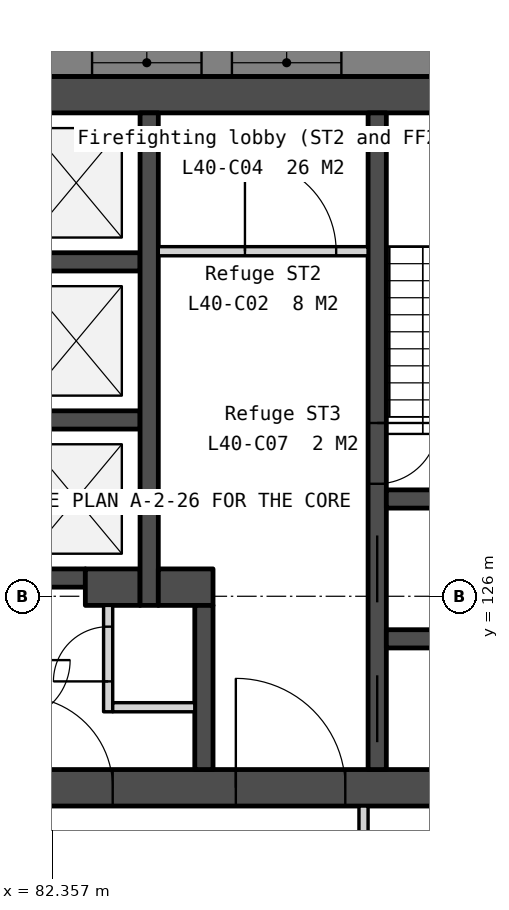
"""IFC4 building model, lengths in metres.
Left out: names, types, materials, properties, quantities, classifications, styles, units other than length and angle.
Written with IfcOpenShell. Run it as: python <this file> out.ifc"""

import sys

from ifc_helpers import new_model, si_unit, direction, frame, frame_2d, origin, place, context, subcontext, project, spatial, polyline, rectangle, outline, extrude, element, fill, save


model = new_model("IFC4")
c1 = context("Model", 3, precision=1e-05, world=origin(), true_north=direction((0.0, 1.0)))
c2 = subcontext(c1, "Body", "Model", "MODEL_VIEW")
j1 = project(units=[si_unit("LENGTHUNIT", "METRE"), si_unit("PLANEANGLEUNIT", "RADIAN")], contexts=[c1])
p1 = place(None, origin())
s1 = spatial("IfcSite", under=j1, at=p1, CompositionType="ELEMENT")
p2 = place(p1, origin())
s2 = spatial("IfcBuilding", under=s1, at=p2, CompositionType="ELEMENT")
p3 = place(p2, frame((0.0, 0.0, 159.8)))
s3 = spatial("IfcBuildingStorey", under=s2, at=p3, CompositionType="ELEMENT", Elevation=159.8)
p4 = place(p3, frame((69.0, 134.25, 0.0), z_axis=(0.0, 0.0, 1.0), x_axis=(1.0, 0.0, 0.0)))
e1 = element("IfcWall", 1, at=p4, inside=s3, PredefinedType="SOLIDWALL", context=c2, shape_type="SweptSolid", body=[
    extrude(rectangle(XDim=22.0, YDim=0.6, at=frame_2d((11.0, 0.0))), origin(), (0.0, 0.0, 1.0), 3.75),
])
p5 = place(p3, frame((69.0, 122.85, 0.0), z_axis=(0.0, 0.0, 1.0), x_axis=(1.0, 0.0, 0.0)))
e2 = element("IfcWall", 2, at=p5, inside=s3, PredefinedType="SOLIDWALL", context=c2, shape_type="SweptSolid", body=[
    extrude(rectangle(XDim=22.0, YDim=0.6, at=frame_2d((11.0, 0.0))), origin(), (0.0, 0.0, 1.0), 3.75),
])
p6 = place(p5, frame((16.375, 0.0, 0.0)))
e3 = element("IfcOpeningElement", 3, at=p6, cuts=e2, PredefinedType="OPENING", context=c2, shape_type="SweptSolid", body=[
    extrude(rectangle(XDim=1.8, YDim=2.1, at=frame_2d((0.9, 1.05))), frame((0.0, 0.31, 0.0), z_axis=(0.0, -1.0, 0.0), x_axis=(1.0, 0.0, 0.0)), (0.0, 0.0, 1.0), 0.62),
])
p7 = place(p5, frame((3.825, 0.0, 0.0)))
e4 = element("IfcOpeningElement", 4, at=p7, cuts=e2, PredefinedType="OPENING", context=c2, shape_type="SweptSolid", body=[
    extrude(rectangle(XDim=1.8, YDim=2.1, at=frame_2d((0.9, 1.05))), frame((0.0, 0.31, 0.0), z_axis=(0.0, -1.0, 0.0), x_axis=(1.0, 0.0, 0.0)), (0.0, 0.0, 1.0), 0.62),
])
p8 = place(p5, frame((12.85, 0.0, 0.0)))
e5 = element("IfcOpeningElement", 5, at=p8, cuts=e2, PredefinedType="OPENING", context=c2, shape_type="SweptSolid", body=[
    extrude(rectangle(XDim=1.5, YDim=2.1, at=frame_2d((0.75, 1.05))), frame((0.0, 0.31, 0.0), z_axis=(0.0, -1.0, 0.0), x_axis=(1.0, 0.0, 0.0)), (0.0, 0.0, 1.0), 0.62),
])
for number, where, z_axis, x_axis in (
    (6, (81.7, 131.5, 0.0), (0.0, 0.0, 1.0), (1.0, 0.0, 0.0)),
    (7, (81.7, 128.9, 0.0), (0.0, 0.0, 1.0), (1.0, 0.0, 0.0)),
):
    element("IfcWall", number, at=place(p3, frame(where, z_axis=z_axis, x_axis=x_axis)), inside=s3, PredefinedType="SOLIDWALL", context=c2, shape_type="SweptSolid", body=[
        extrude(rectangle(XDim=2.1, YDim=0.3, at=frame_2d((1.05, 0.0))), origin(), (0.0, 0.0, 1.0), 3.75),
    ])
p9 = place(p3, frame((81.7, 126.3, 0.0), z_axis=(0.0, 0.0, 1.0), x_axis=(1.0, 0.0, 0.0)))
e8 = element("IfcWall", 8, at=p9, inside=s3, PredefinedType="SOLIDWALL", context=c2, shape_type="SweptSolid", body=[
    extrude(rectangle(XDim=1.2, YDim=0.3, at=frame_2d((0.6, 0.0))), origin(), (0.0, 0.0, 1.0), 3.75),
])
p10 = place(p3, frame((82.9, 126.15, 0.0), z_axis=(0.0, 0.0, 1.0), x_axis=(1.0, 0.0, 0.0)))
e9 = element("IfcWall", 9, at=p10, inside=s3, PredefinedType="SOLIDWALL", context=c2, shape_type="SweptSolid", body=[
    extrude(rectangle(XDim=0.9, YDim=0.6, at=frame_2d((0.45, 0.0))), origin(), (0.0, 0.0, 1.0), 3.75),
])
p11 = place(p3, frame((83.275, 125.85, 0.0), z_axis=(0.0, 0.0, 1.0), x_axis=(0.0, -1.0, 0.0)))
e10 = element("IfcWall", 10, at=p11, inside=s3, PredefinedType="PARTITIONING", context=c2, shape_type="SweptSolid", body=[
    extrude(rectangle(XDim=1.75, YDim=0.15, at=frame_2d((0.875, 0.0))), origin(), (0.0, 0.0, 1.0), 3.75),
])
p12 = place(p11, frame((0.35, 0.0, 0.0)))
e11 = element("IfcOpeningElement", 11, at=p12, cuts=e10, PredefinedType="OPENING", context=c2, shape_type="SweptSolid", body=[
    extrude(rectangle(XDim=0.9, YDim=2.1, at=frame_2d((0.45, 1.05))), frame((0.0, 0.085, 0.0), z_axis=(0.0, -1.0, 0.0), x_axis=(1.0, 0.0, 0.0)), (0.0, 0.0, 1.0), 0.17),
])
p13 = place(p3, frame((83.35, 124.175, 0.0), z_axis=(0.0, 0.0, 1.0), x_axis=(1.0, 0.0, 0.0)))
e12 = element("IfcWall", 12, at=p13, inside=s3, PredefinedType="PARTITIONING", context=c2, shape_type="SweptSolid", body=[
    extrude(rectangle(XDim=1.35, YDim=0.15, at=frame_2d((0.675, 0.0))), origin(), (0.0, 0.0, 1.0), 3.75),
])
p14 = place(p3, frame((83.95, 133.95, 0.0), z_axis=(0.0, 0.0, 1.0), x_axis=(0.0, -1.0, 0.0)))
e13 = element("IfcWall", 13, at=p14, inside=s3, PredefinedType="SOLIDWALL", context=c2, shape_type="SweptSolid", body=[
    extrude(rectangle(XDim=8.1, YDim=0.3, at=frame_2d((4.05, 0.0))), origin(), (0.0, 0.0, 1.0), 3.75),
])
p15 = place(p3, frame((84.1, 131.675, 0.0), z_axis=(0.0, 0.0, 1.0), x_axis=(1.0, 0.0, 0.0)))
e14 = element("IfcWall", 14, at=p15, inside=s3, PredefinedType="PARTITIONING", context=c2, shape_type="SweptSolid", body=[
    extrude(rectangle(XDim=3.45, YDim=0.15, at=frame_2d((1.725, 0.0))), origin(), (0.0, 0.0, 1.0), 3.75),
])
p16 = place(p15, frame((1.425, 0.0, 0.0)))
e15 = element("IfcOpeningElement", 15, at=p16, cuts=e14, PredefinedType="OPENING", context=c2, shape_type="SweptSolid", body=[
    extrude(rectangle(XDim=1.5, YDim=2.1, at=frame_2d((0.75, 1.05))), frame((0.0, 0.085, 0.0), z_axis=(0.0, -1.0, 0.0), x_axis=(1.0, 0.0, 0.0)), (0.0, 0.0, 1.0), 0.17),
])
p17 = place(p3, frame((84.1, 126.15, 0.0), z_axis=(0.0, 0.0, 1.0), x_axis=(1.0, 0.0, 0.0)))
e16 = element("IfcWall", 16, at=p17, inside=s3, PredefinedType="SOLIDWALL", context=c2, shape_type="SweptSolid", body=[
    extrude(rectangle(XDim=0.9, YDim=0.6, at=frame_2d((0.45, 0.0))), origin(), (0.0, 0.0, 1.0), 3.75),
])
p18 = place(p3, frame((84.85, 125.85, 0.0), z_axis=(0.0, 0.0, 1.0), x_axis=(0.0, -1.0, 0.0)))
e17 = element("IfcWall", 17, at=p18, inside=s3, PredefinedType="SOLIDWALL", context=c2, shape_type="SweptSolid", body=[
    extrude(rectangle(XDim=2.7, YDim=0.3, at=frame_2d((1.35, 0.0))), origin(), (0.0, 0.0, 1.0), 3.75),
])
p19 = place(p3, frame((87.7, 133.95, 0.0), z_axis=(0.0, 0.0, 1.0), x_axis=(0.0, -1.0, 0.0)))
e18 = element("IfcWall", 18, at=p19, inside=s3, PredefinedType="SOLIDWALL", context=c2, shape_type="SweptSolid", body=[
    extrude(rectangle(XDim=10.8, YDim=0.3, at=frame_2d((5.4, 0.0))), origin(), (0.0, 0.0, 1.0), 3.75),
])
p20 = place(p19, frame((6.95, 0.0, 0.0)))
e19 = element("IfcOpeningElement", 19, at=p20, cuts=e18, PredefinedType="OPENING", context=c2, shape_type="SweptSolid", body=[
    extrude(rectangle(XDim=1.1, YDim=2.1, at=frame_2d((0.55, 1.05))), frame((0.0, 0.16, 0.0), z_axis=(0.0, -1.0, 0.0), x_axis=(1.0, 0.0, 0.0)), (0.0, 0.0, 1.0), 0.32),
])
p21 = place(p19, frame((5.1, 0.0, 0.0)))
e20 = element("IfcOpeningElement", 20, at=p21, cuts=e18, PredefinedType="OPENING", context=c2, shape_type="SweptSolid", body=[
    extrude(rectangle(XDim=1.0, YDim=2.1, at=frame_2d((0.5, 1.05))), frame((0.0, 0.16, 0.0), z_axis=(0.0, -1.0, 0.0), x_axis=(1.0, 0.0, 0.0)), (0.0, 0.0, 1.0), 0.32),
])
p22 = place(p19, frame((9.25, 0.0, 0.0)))
e21 = element("IfcOpeningElement", 21, at=p22, cuts=e18, PredefinedType="OPENING", context=c2, shape_type="SweptSolid", body=[
    extrude(rectangle(XDim=1.1, YDim=2.1, at=frame_2d((0.55, 1.05))), frame((0.0, 0.16, 0.0), z_axis=(0.0, -1.0, 0.0), x_axis=(1.0, 0.0, 0.0)), (0.0, 0.0, 1.0), 0.32),
])
for number, where, z_axis, x_axis in (
    (22, (87.85, 127.6, 0.0), (0.0, 0.0, 1.0), (1.0, 0.0, 0.0)),
    (23, (87.85, 125.3, 0.0), (0.0, 0.0, 1.0), (1.0, 0.0, 0.0)),
):
    element("IfcWall", number, at=place(p3, frame(where, z_axis=z_axis, x_axis=x_axis)), inside=s3, PredefinedType="SOLIDWALL", context=c2, shape_type="SweptSolid", body=[
        extrude(rectangle(XDim=2.55, YDim=0.3, at=frame_2d((1.275, 0.0))), origin(), (0.0, 0.0, 1.0), 3.75),
    ])
p23 = place(p3, frame((100.243, 134.775, -0.15), z_axis=(0.0, 0.0, 1.0), x_axis=(-1.0, 0.0, 0.0)))
e24 = element("IfcWall", 24, at=p23, inside=s3, PredefinedType="SOLIDWALL", context=c2, shape_type="SweptSolid", body=[
    extrude(outline(polyline([(40.486, 0.0), (40.486, 3.9), (0.0, 3.9), (0.0, 0.0), (40.486, 0.0)])), frame((0.0, 0.225, 0.0), z_axis=(0.0, -1.0, 0.0), x_axis=(1.0, 0.0, 0.0)), (0.0, 0.0, 1.0), 0.45),
])
p24 = place(p23, frame((3.011, 0.0, 0.95)))
e25 = element("IfcOpeningElement", 25, at=p24, cuts=e24, PredefinedType="OPENING", context=c2, shape_type="SweptSolid", body=[
    extrude(rectangle(XDim=1.8, YDim=2.2, at=frame_2d((0.9, 1.1))), frame((0.0, 0.235, 0.0), z_axis=(0.0, -1.0, 0.0), x_axis=(1.0, 0.0, 0.0)), (0.0, 0.0, 1.0), 0.47),
])
p25 = place(p23, frame((5.311, 0.0, 0.95)))
e26 = element("IfcOpeningElement", 26, at=p25, cuts=e24, PredefinedType="OPENING", context=c2, shape_type="SweptSolid", body=[
    extrude(rectangle(XDim=1.8, YDim=2.2, at=frame_2d((0.9, 1.1))), frame((0.0, 0.235, 0.0), z_axis=(0.0, -1.0, 0.0), x_axis=(1.0, 0.0, 0.0)), (0.0, 0.0, 1.0), 0.47),
])
p26 = place(p23, frame((13.132, 0.0, 0.95)))
e27 = element("IfcOpeningElement", 27, at=p26, cuts=e24, PredefinedType="OPENING", context=c2, shape_type="SweptSolid", body=[
    extrude(rectangle(XDim=1.8, YDim=2.2, at=frame_2d((0.9, 1.1))), frame((0.0, 0.235, 0.0), z_axis=(0.0, -1.0, 0.0), x_axis=(1.0, 0.0, 0.0)), (0.0, 0.0, 1.0), 0.47),
])
p27 = place(p23, frame((15.432, 0.0, 0.95)))
e28 = element("IfcOpeningElement", 28, at=p27, cuts=e24, PredefinedType="OPENING", context=c2, shape_type="SweptSolid", body=[
    extrude(rectangle(XDim=1.8, YDim=2.2, at=frame_2d((0.9, 1.1))), frame((0.0, 0.235, 0.0), z_axis=(0.0, -1.0, 0.0), x_axis=(1.0, 0.0, 0.0)), (0.0, 0.0, 1.0), 0.47),
])
p28 = place(p23, frame((23.254, 0.0, 0.95)))
e29 = element("IfcOpeningElement", 29, at=p28, cuts=e24, PredefinedType="OPENING", context=c2, shape_type="SweptSolid", body=[
    extrude(rectangle(XDim=1.8, YDim=2.2, at=frame_2d((0.9, 1.1))), frame((0.0, 0.235, 0.0), z_axis=(0.0, -1.0, 0.0), x_axis=(1.0, 0.0, 0.0)), (0.0, 0.0, 1.0), 0.47),
])
p29 = place(p23, frame((25.554, 0.0, 0.95)))
e30 = element("IfcOpeningElement", 30, at=p29, cuts=e24, PredefinedType="OPENING", context=c2, shape_type="SweptSolid", body=[
    extrude(rectangle(XDim=1.8, YDim=2.2, at=frame_2d((0.9, 1.1))), frame((0.0, 0.235, 0.0), z_axis=(0.0, -1.0, 0.0), x_axis=(1.0, 0.0, 0.0)), (0.0, 0.0, 1.0), 0.47),
])
p30 = place(p23, frame((33.375, 0.0, 0.95)))
e31 = element("IfcOpeningElement", 31, at=p30, cuts=e24, PredefinedType="OPENING", context=c2, shape_type="SweptSolid", body=[
    extrude(rectangle(XDim=1.8, YDim=2.2, at=frame_2d((0.9, 1.1))), frame((0.0, 0.235, 0.0), z_axis=(0.0, -1.0, 0.0), x_axis=(1.0, 0.0, 0.0)), (0.0, 0.0, 1.0), 0.47),
])
p31 = place(p23, frame((35.675, 0.0, 0.95)))
e32 = element("IfcOpeningElement", 32, at=p31, cuts=e24, PredefinedType="OPENING", context=c2, shape_type="SweptSolid", body=[
    extrude(rectangle(XDim=1.8, YDim=2.2, at=frame_2d((0.9, 1.1))), frame((0.0, 0.235, 0.0), z_axis=(0.0, -1.0, 0.0), x_axis=(1.0, 0.0, 0.0)), (0.0, 0.0, 1.0), 0.47),
])
p32 = place(p3, frame((82.105, 96.067, -0.15), z_axis=(0.0, 0.0, 1.0), x_axis=(0.499997369791, 0.866026922331, 0.0)))
e33 = element("IfcWall", 33, at=p32, inside=s3, PredefinedType="SOLIDWALL", context=c2, shape_type="SweptSolid", body=[
    extrude(outline(polyline([(40.486, 0.0), (40.486, 3.9), (0.0, 3.9), (0.0, 0.0), (40.486, 0.0)])), frame((0.0, 0.225, 0.0), z_axis=(0.0, -1.0, 0.0), x_axis=(1.0, 0.0, 0.0)), (0.0, 0.0, 1.0), 0.45),
])
p33 = place(p32, frame((3.011, 0.0, 0.95)))
e34 = element("IfcOpeningElement", 34, at=p33, cuts=e33, PredefinedType="OPENING", context=c2, shape_type="SweptSolid", body=[
    extrude(rectangle(XDim=1.8, YDim=2.2, at=frame_2d((0.9, 1.1))), frame((0.0, 0.235, 0.0), z_axis=(0.0, -1.0, 0.0), x_axis=(1.0, 0.0, 0.0)), (0.0, 0.0, 1.0), 0.47),
])
p34 = place(p32, frame((5.311, 0.0, 0.95)))
e35 = element("IfcOpeningElement", 35, at=p34, cuts=e33, PredefinedType="OPENING", context=c2, shape_type="SweptSolid", body=[
    extrude(rectangle(XDim=1.8, YDim=2.2, at=frame_2d((0.9, 1.1))), frame((0.0, 0.235, 0.0), z_axis=(0.0, -1.0, 0.0), x_axis=(1.0, 0.0, 0.0)), (0.0, 0.0, 1.0), 0.47),
])
p35 = place(p32, frame((13.132, 0.0, 0.95)))
e36 = element("IfcOpeningElement", 36, at=p35, cuts=e33, PredefinedType="OPENING", context=c2, shape_type="SweptSolid", body=[
    extrude(rectangle(XDim=1.8, YDim=2.2, at=frame_2d((0.9, 1.1))), frame((0.0, 0.235, 0.0), z_axis=(0.0, -1.0, 0.0), x_axis=(1.0, 0.0, 0.0)), (0.0, 0.0, 1.0), 0.47),
])
p36 = place(p32, frame((15.432, 0.0, 0.95)))
e37 = element("IfcOpeningElement", 37, at=p36, cuts=e33, PredefinedType="OPENING", context=c2, shape_type="SweptSolid", body=[
    extrude(rectangle(XDim=1.8, YDim=2.2, at=frame_2d((0.9, 1.1))), frame((0.0, 0.235, 0.0), z_axis=(0.0, -1.0, 0.0), x_axis=(1.0, 0.0, 0.0)), (0.0, 0.0, 1.0), 0.47),
])
p37 = place(p32, frame((23.254, 0.0, 0.95)))
e38 = element("IfcOpeningElement", 38, at=p37, cuts=e33, PredefinedType="OPENING", context=c2, shape_type="SweptSolid", body=[
    extrude(rectangle(XDim=1.8, YDim=2.2, at=frame_2d((0.9, 1.1))), frame((0.0, 0.235, 0.0), z_axis=(0.0, -1.0, 0.0), x_axis=(1.0, 0.0, 0.0)), (0.0, 0.0, 1.0), 0.47),
])
p38 = place(p32, frame((25.554, 0.0, 0.95)))
e39 = element("IfcOpeningElement", 39, at=p38, cuts=e33, PredefinedType="OPENING", context=c2, shape_type="SweptSolid", body=[
    extrude(rectangle(XDim=1.8, YDim=2.2, at=frame_2d((0.9, 1.1))), frame((0.0, 0.235, 0.0), z_axis=(0.0, -1.0, 0.0), x_axis=(1.0, 0.0, 0.0)), (0.0, 0.0, 1.0), 0.47),
])
p39 = place(p32, frame((33.375, 0.0, 0.95)))
e40 = element("IfcOpeningElement", 40, at=p39, cuts=e33, PredefinedType="OPENING", context=c2, shape_type="SweptSolid", body=[
    extrude(rectangle(XDim=1.8, YDim=2.2, at=frame_2d((0.9, 1.1))), frame((0.0, 0.235, 0.0), z_axis=(0.0, -1.0, 0.0), x_axis=(1.0, 0.0, 0.0)), (0.0, 0.0, 1.0), 0.47),
])
p40 = place(p32, frame((35.675, 0.0, 0.95)))
e41 = element("IfcOpeningElement", 41, at=p40, cuts=e33, PredefinedType="OPENING", context=c2, shape_type="SweptSolid", body=[
    extrude(rectangle(XDim=1.8, YDim=2.2, at=frame_2d((0.9, 1.1))), frame((0.0, 0.235, 0.0), z_axis=(0.0, -1.0, 0.0), x_axis=(1.0, 0.0, 0.0)), (0.0, 0.0, 1.0), 0.47),
])
p41 = place(p3, frame((87.475, 120.05, 0.0), z_axis=(0.0, 0.0, 1.0), x_axis=(0.0, 1.0, 0.0)))
e42 = element("IfcWall", 42, at=p41, inside=s3, PredefinedType="PARTITIONING", context=c2, shape_type="SweptSolid", body=[
    extrude(rectangle(XDim=2.5, YDim=0.15, at=frame_2d((1.25, 0.0))), origin(), (0.0, 0.0, 1.0), 3.75),
])
p42 = place(p41, frame((0.75, 0.0, 0.0)))
e43 = element("IfcOpeningElement", 43, at=p42, cuts=e42, PredefinedType="OPENING", context=c2, shape_type="SweptSolid", body=[
    extrude(rectangle(XDim=1.0, YDim=2.1, at=frame_2d((0.5, 1.05))), frame((0.0, 0.085, 0.0), z_axis=(0.0, -1.0, 0.0), x_axis=(1.0, 0.0, 0.0)), (0.0, 0.0, 1.0), 0.17),
])
p43 = place(p20, origin())
e44 = element("IfcDoor", 44, at=p43, inside=s3, OperationType="SLIDING_TO_LEFT", PredefinedType="DOOR", context=c2, shape_type="SweptSolid", body=[
    extrude(rectangle(XDim=1.1, YDim=2.1, at=frame_2d((0.55, 1.05))), frame((0.0, 0.025, 0.0), z_axis=(0.0, -1.0, 0.0), x_axis=(1.0, 0.0, 0.0)), (0.0, 0.0, 1.0), 0.05),
])
fill(e19, e44)
p44 = place(p6, origin())
e45 = element("IfcDoor", 45, at=p44, inside=s3, OperationType="DOUBLE_DOOR_DOUBLE_SWING", PredefinedType="DOOR", context=c2, shape_type="SweptSolid", body=[
    extrude(rectangle(XDim=1.8, YDim=2.1, at=frame_2d((0.9, 1.05))), frame((0.0, 0.025, 0.0), z_axis=(0.0, -1.0, 0.0), x_axis=(1.0, 0.0, 0.0)), (0.0, 0.0, 1.0), 0.05),
])
fill(e3, e45)
p45 = place(p8, origin())
e46 = element("IfcDoor", 46, at=p45, inside=s3, OperationType="DOUBLE_DOOR_DOUBLE_SWING", PredefinedType="DOOR", context=c2, shape_type="SweptSolid", body=[
    extrude(rectangle(XDim=1.5, YDim=2.1, at=frame_2d((0.75, 1.05))), frame((0.0, 0.025, 0.0), z_axis=(0.0, -1.0, 0.0), x_axis=(1.0, 0.0, 0.0)), (0.0, 0.0, 1.0), 0.05),
])
fill(e5, e46)
p46 = place(p12, origin())
e47 = element("IfcDoor", 47, at=p46, inside=s3, OperationType="SINGLE_SWING_RIGHT", PredefinedType="DOOR", context=c2, shape_type="SweptSolid", body=[
    extrude(rectangle(XDim=0.9, YDim=2.1, at=frame_2d((0.45, 1.05))), frame((0.0, 0.025, 0.0), z_axis=(0.0, -1.0, 0.0), x_axis=(1.0, 0.0, 0.0)), (0.0, 0.0, 1.0), 0.05),
])
fill(e11, e47)
p47 = place(p16, origin())
e48 = element("IfcDoor", 48, at=p47, inside=s3, OperationType="DOUBLE_DOOR_DOUBLE_SWING", PredefinedType="DOOR", context=c2, shape_type="SweptSolid", body=[
    extrude(rectangle(XDim=1.5, YDim=2.1, at=frame_2d((0.75, 1.05))), frame((0.0, 0.025, 0.0), z_axis=(0.0, -1.0, 0.0), x_axis=(1.0, 0.0, 0.0)), (0.0, 0.0, 1.0), 0.05),
])
fill(e15, e48)
p48 = place(p21, origin())
e49 = element("IfcDoor", 49, at=p48, inside=s3, OperationType="SINGLE_SWING_LEFT", PredefinedType="DOOR", context=c2, shape_type="SweptSolid", body=[
    extrude(rectangle(XDim=1.0, YDim=2.1, at=frame_2d((0.5, 1.05))), frame((0.0, 0.025, 0.0), z_axis=(0.0, -1.0, 0.0), x_axis=(1.0, 0.0, 0.0)), (0.0, 0.0, 1.0), 0.05),
])
fill(e20, e49)
p49 = place(p22, origin())
e50 = element("IfcDoor", 50, at=p49, inside=s3, OperationType="SLIDING_TO_LEFT", PredefinedType="DOOR", context=c2, shape_type="SweptSolid", body=[
    extrude(rectangle(XDim=1.1, YDim=2.1, at=frame_2d((0.55, 1.05))), frame((0.0, 0.025, 0.0), z_axis=(0.0, -1.0, 0.0), x_axis=(1.0, 0.0, 0.0)), (0.0, 0.0, 1.0), 0.05),
])
fill(e21, e50)
p50 = place(p26, origin())
e51 = element("IfcWindow", 51, at=p50, inside=s3, PartitioningType="SINGLE_PANEL", PredefinedType="WINDOW", context=c2, shape_type="SweptSolid", body=[
    extrude(rectangle(XDim=1.8, YDim=2.2, at=frame_2d((0.9, 1.1))), frame((0.0, 0.03, 0.0), z_axis=(0.0, -1.0, 0.0), x_axis=(1.0, 0.0, 0.0)), (0.0, 0.0, 1.0), 0.06),
])
fill(e27, e51)
p51 = place(p27, origin())
e52 = element("IfcWindow", 52, at=p51, inside=s3, PartitioningType="SINGLE_PANEL", PredefinedType="WINDOW", context=c2, shape_type="SweptSolid", body=[
    extrude(rectangle(XDim=1.8, YDim=2.2, at=frame_2d((0.9, 1.1))), frame((0.0, 0.03, 0.0), z_axis=(0.0, -1.0, 0.0), x_axis=(1.0, 0.0, 0.0)), (0.0, 0.0, 1.0), 0.06),
])
fill(e28, e52)
save(model, sys.argv[1])
